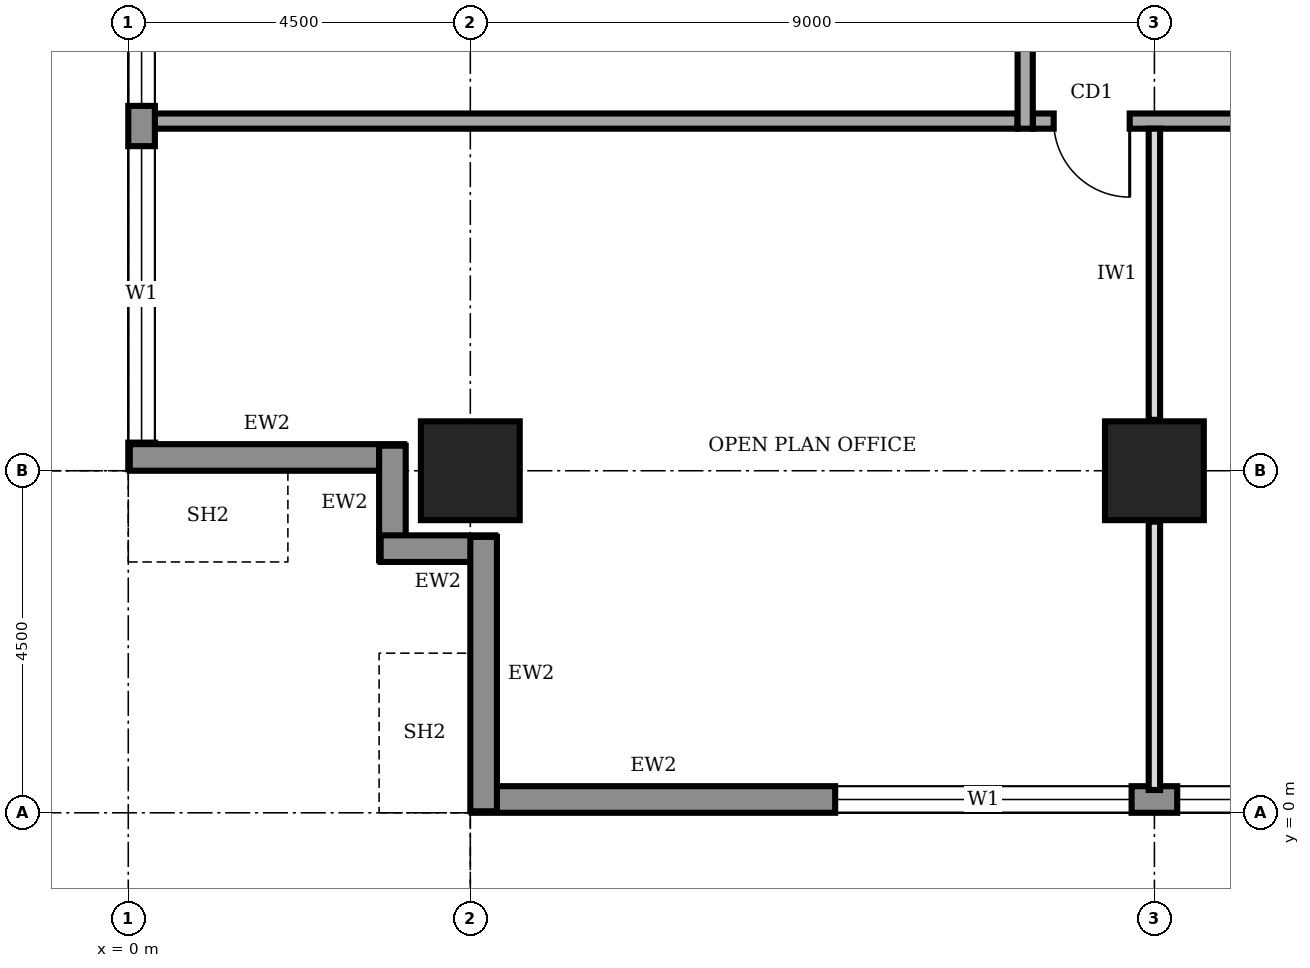
"""IFC4 building model, lengths in metres.
Left out: names, types, materials, properties, quantities, classifications, styles, units other than length and angle.
Written with IfcOpenShell. Run it as: python <this file> out.ifc"""

import sys

from ifc_helpers import new_model, si_unit, direction, frame, frame_2d, origin, origin_2d, place, context, subcontext, project, spatial, rectangle, extrude, element, fill, save


model = new_model("IFC4")
c1 = context("Model", 3, precision=1e-05, world=origin(), true_north=direction((0.0, 1.0)))
c2 = subcontext(c1, "Body", "Model", "MODEL_VIEW")
j1 = project(units=[si_unit("LENGTHUNIT", "METRE"), si_unit("PLANEANGLEUNIT", "RADIAN")], contexts=[c1])
p1 = place(None, origin())
s1 = spatial("IfcSite", under=j1, at=p1, CompositionType="ELEMENT")
p2 = place(p1, origin())
s2 = spatial("IfcBuilding", under=s1, at=p2, CompositionType="ELEMENT")
p3 = place(p2, frame((0.0, 0.0, 281.0)))
s3 = spatial("IfcBuildingStorey", under=s2, at=p3, CompositionType="ELEMENT", Elevation=281.0)
for number, where, z_axis, x_axis in (
    (1, (4.5, 4.5, 0.0), (0.0, 0.0, 1.0), (1.0, 0.0, 0.0)),
    (2, (13.5, 4.5, 0.0), (0.0, 0.0, 1.0), (1.0, 0.0, 0.0)),
):
    element("IfcColumn", number, at=place(p3, frame(where, z_axis=z_axis, x_axis=x_axis)), inside=s3, PredefinedType="COLUMN", context=c2, shape_type="SweptSolid", body=[
        extrude(rectangle(XDim=1.3, YDim=1.3, at=origin_2d()), origin(), (0.0, 0.0, 1.0), 4.0),
    ])
p4 = place(p3, frame((4.52, 0.175, 0.0), z_axis=(0.0, 0.0, 1.0), x_axis=(1.0, 0.0, 0.0)))
e3 = element("IfcWall", 3, at=p4, inside=s3, PredefinedType="STANDARD", context=c2, shape_type="SweptSolid", body=[
    extrude(rectangle(XDim=31.46, YDim=0.35, at=frame_2d((15.73, 0.0))), origin(), (0.0, 0.0, 1.0), 3.75),
])
p5 = place(p4, frame((4.78, 0.0, 0.9)))
e4 = element("IfcOpeningElement", 4, at=p5, cuts=e3, PredefinedType="OPENING", context=c2, shape_type="SweptSolid", body=[
    extrude(rectangle(XDim=3.9, YDim=2.2, at=frame_2d((1.95, 1.1))), frame((0.0, 0.185, 0.0), z_axis=(0.0, -1.0, 0.0), x_axis=(1.0, 0.0, 0.0)), (0.0, 0.0, 1.0), 0.37),
])
p6 = place(p4, frame((9.28, 0.0, 0.9)))
e5 = element("IfcOpeningElement", 5, at=p6, cuts=e3, PredefinedType="OPENING", context=c2, shape_type="SweptSolid", body=[
    extrude(rectangle(XDim=3.9, YDim=2.2, at=frame_2d((1.95, 1.1))), frame((0.0, 0.185, 0.0), z_axis=(0.0, -1.0, 0.0), x_axis=(1.0, 0.0, 0.0)), (0.0, 0.0, 1.0), 0.37),
])
p7 = place(p4, frame((13.78, 0.0, 0.9)))
e6 = element("IfcOpeningElement", 6, at=p7, cuts=e3, PredefinedType="OPENING", context=c2, shape_type="SweptSolid", body=[
    extrude(rectangle(XDim=3.9, YDim=2.2, at=frame_2d((1.95, 1.1))), frame((0.0, 0.185, 0.0), z_axis=(0.0, -1.0, 0.0), x_axis=(1.0, 0.0, 0.0)), (0.0, 0.0, 1.0), 0.37),
])
p8 = place(p4, frame((18.28, 0.0, 0.9)))
e7 = element("IfcOpeningElement", 7, at=p8, cuts=e3, PredefinedType="OPENING", context=c2, shape_type="SweptSolid", body=[
    extrude(rectangle(XDim=3.9, YDim=2.2, at=frame_2d((1.95, 1.1))), frame((0.0, 0.185, 0.0), z_axis=(0.0, -1.0, 0.0), x_axis=(1.0, 0.0, 0.0)), (0.0, 0.0, 1.0), 0.37),
])
p9 = place(p4, frame((22.78, 0.0, 0.9)))
e8 = element("IfcOpeningElement", 8, at=p9, cuts=e3, PredefinedType="OPENING", context=c2, shape_type="SweptSolid", body=[
    extrude(rectangle(XDim=3.9, YDim=2.2, at=frame_2d((1.95, 1.1))), frame((0.0, 0.185, 0.0), z_axis=(0.0, -1.0, 0.0), x_axis=(1.0, 0.0, 0.0)), (0.0, 0.0, 1.0), 0.37),
])
p10 = place(p4, frame((27.21, 0.0, 0.9)))
e9 = element("IfcOpeningElement", 9, at=p10, cuts=e3, PredefinedType="OPENING", context=c2, shape_type="SweptSolid", body=[
    extrude(rectangle(XDim=3.9, YDim=2.2, at=frame_2d((1.95, 1.1))), frame((0.0, 0.185, 0.0), z_axis=(0.0, -1.0, 0.0), x_axis=(1.0, 0.0, 0.0)), (0.0, 0.0, 1.0), 0.37),
])
p11 = place(p3, frame((0.175, 35.98, 0.0), z_axis=(0.0, 0.0, 1.0), x_axis=(0.0, -1.0, 0.0)))
e10 = element("IfcWall", 10, at=p11, inside=s3, PredefinedType="STANDARD", context=c2, shape_type="SweptSolid", body=[
    extrude(rectangle(XDim=31.46, YDim=0.35, at=frame_2d((15.73, 0.0))), origin(), (0.0, 0.0, 1.0), 3.75),
])
p12 = place(p11, frame((27.21, 0.0, 0.9)))
e11 = element("IfcOpeningElement", 11, at=p12, cuts=e10, PredefinedType="OPENING", context=c2, shape_type="SweptSolid", body=[
    extrude(rectangle(XDim=3.9, YDim=2.2, at=frame_2d((1.95, 1.1))), frame((0.0, 0.185, 0.0), z_axis=(0.0, -1.0, 0.0), x_axis=(1.0, 0.0, 0.0)), (0.0, 0.0, 1.0), 0.37),
])
p13 = place(p11, frame((22.78, 0.0, 0.9)))
e12 = element("IfcOpeningElement", 12, at=p13, cuts=e10, PredefinedType="OPENING", context=c2, shape_type="SweptSolid", body=[
    extrude(rectangle(XDim=3.9, YDim=2.2, at=frame_2d((1.95, 1.1))), frame((0.0, 0.185, 0.0), z_axis=(0.0, -1.0, 0.0), x_axis=(1.0, 0.0, 0.0)), (0.0, 0.0, 1.0), 0.37),
])
p14 = place(p11, frame((18.28, 0.0, 0.9)))
e13 = element("IfcOpeningElement", 13, at=p14, cuts=e10, PredefinedType="OPENING", context=c2, shape_type="SweptSolid", body=[
    extrude(rectangle(XDim=3.9, YDim=2.2, at=frame_2d((1.95, 1.1))), frame((0.0, 0.185, 0.0), z_axis=(0.0, -1.0, 0.0), x_axis=(1.0, 0.0, 0.0)), (0.0, 0.0, 1.0), 0.37),
])
p15 = place(p11, frame((13.78, 0.0, 0.9)))
e14 = element("IfcOpeningElement", 14, at=p15, cuts=e10, PredefinedType="OPENING", context=c2, shape_type="SweptSolid", body=[
    extrude(rectangle(XDim=3.9, YDim=2.2, at=frame_2d((1.95, 1.1))), frame((0.0, 0.185, 0.0), z_axis=(0.0, -1.0, 0.0), x_axis=(1.0, 0.0, 0.0)), (0.0, 0.0, 1.0), 0.37),
])
p16 = place(p11, frame((9.28, 0.0, 0.9)))
e15 = element("IfcOpeningElement", 15, at=p16, cuts=e10, PredefinedType="OPENING", context=c2, shape_type="SweptSolid", body=[
    extrude(rectangle(XDim=3.9, YDim=2.2, at=frame_2d((1.95, 1.1))), frame((0.0, 0.185, 0.0), z_axis=(0.0, -1.0, 0.0), x_axis=(1.0, 0.0, 0.0)), (0.0, 0.0, 1.0), 0.37),
])
p17 = place(p11, frame((4.78, 0.0, 0.9)))
e16 = element("IfcOpeningElement", 16, at=p17, cuts=e10, PredefinedType="OPENING", context=c2, shape_type="SweptSolid", body=[
    extrude(rectangle(XDim=3.9, YDim=2.2, at=frame_2d((1.95, 1.1))), frame((0.0, 0.185, 0.0), z_axis=(0.0, -1.0, 0.0), x_axis=(1.0, 0.0, 0.0)), (0.0, 0.0, 1.0), 0.37),
])
p18 = place(p3, frame((0.02, 4.675, 0.0), z_axis=(0.0, 0.0, 1.0), x_axis=(1.0, 0.0, 0.0)))
e17 = element("IfcWall", 17, at=p18, inside=s3, PredefinedType="STANDARD", context=c2, shape_type="SweptSolid", body=[
    extrude(rectangle(XDim=3.61, YDim=0.35, at=frame_2d((1.805, 0.0))), origin(), (0.0, 0.0, 1.0), 2.85),
])
for number, where, z_axis, x_axis in (
    (18, (3.475, 4.83, 0.0), (0.0, 0.0, 1.0), (0.0, -1.0, 0.0)),
    (19, (3.32, 3.475, 0.0), (0.0, 0.0, 1.0), (1.0, 0.0, 0.0)),
):
    element("IfcWall", number, at=place(p3, frame(where, z_axis=z_axis, x_axis=x_axis)), inside=s3, PredefinedType="STANDARD", context=c2, shape_type="SweptSolid", body=[
        extrude(rectangle(XDim=1.51, YDim=0.35, at=frame_2d((0.755, 0.0))), origin(), (0.0, 0.0, 1.0), 3.75),
    ])
p19 = place(p3, frame((4.675, 3.63, 0.0), z_axis=(0.0, 0.0, 1.0), x_axis=(0.0, -1.0, 0.0)))
e20 = element("IfcWall", 20, at=p19, inside=s3, PredefinedType="STANDARD", context=c2, shape_type="SweptSolid", body=[
    extrude(rectangle(XDim=3.61, YDim=0.35, at=frame_2d((1.805, 0.0))), origin(), (0.0, 0.0, 1.0), 2.85),
])
p20 = place(p3, frame((11.9, 9.1, 0.0), z_axis=(0.0, 0.0, 1.0), x_axis=(1.0, 0.0, 0.0)))
e21 = element("IfcWall", 21, at=p20, inside=s3, PredefinedType="SOLIDWALL", context=c2, shape_type="SweptSolid", body=[
    extrude(rectangle(XDim=16.9, YDim=0.2, at=frame_2d((8.45, 0.0))), origin(), (0.0, 0.0, 1.0), 3.75),
])
p21 = place(p20, frame((0.275, 0.0, 0.0)))
e22 = element("IfcOpeningElement", 22, at=p21, cuts=e21, PredefinedType="OPENING", context=c2, shape_type="SweptSolid", body=[
    extrude(rectangle(XDim=1.0, YDim=2.1, at=frame_2d((0.5, 1.05))), frame((0.0, 0.11, 0.0), z_axis=(0.0, -1.0, 0.0), x_axis=(1.0, 0.0, 0.0)), (0.0, 0.0, 1.0), 0.22),
])
p22 = place(p20, frame((8.35, 0.0, 0.0)))
e23 = element("IfcOpeningElement", 23, at=p22, cuts=e21, PredefinedType="OPENING", context=c2, shape_type="SweptSolid", body=[
    extrude(rectangle(XDim=1.8, YDim=2.1, at=frame_2d((0.9, 1.05))), frame((0.0, 0.11, 0.0), z_axis=(0.0, -1.0, 0.0), x_axis=(1.0, 0.0, 0.0)), (0.0, 0.0, 1.0), 0.22),
])
p23 = place(p3, frame((11.8, 32.8, 0.0), z_axis=(0.0, 0.0, 1.0), x_axis=(0.0, -1.0, 0.0)))
e24 = element("IfcWall", 24, at=p23, inside=s3, PredefinedType="SOLIDWALL", context=c2, shape_type="SweptSolid", body=[
    extrude(rectangle(XDim=23.8, YDim=0.2, at=frame_2d((11.9, 0.0))), origin(), (0.0, 0.0, 1.0), 3.75),
])
p24 = place(p23, frame((21.05, 0.0, 0.0)))
e25 = element("IfcOpeningElement", 25, at=p24, cuts=e24, PredefinedType="OPENING", context=c2, shape_type="SweptSolid", body=[
    extrude(rectangle(XDim=1.0, YDim=2.1, at=frame_2d((0.5, 1.05))), frame((0.0, 0.11, 0.0), z_axis=(0.0, -1.0, 0.0), x_axis=(1.0, 0.0, 0.0)), (0.0, 0.0, 1.0), 0.22),
])
p25 = place(p23, frame((17.65, 0.0, 0.0)))
e26 = element("IfcOpeningElement", 26, at=p25, cuts=e24, PredefinedType="OPENING", context=c2, shape_type="SweptSolid", body=[
    extrude(rectangle(XDim=0.9, YDim=2.1, at=frame_2d((0.45, 1.05))), frame((0.0, 0.11, 0.0), z_axis=(0.0, -1.0, 0.0), x_axis=(1.0, 0.0, 0.0)), (0.0, 0.0, 1.0), 0.22),
])
p26 = place(p23, frame((14.45, 0.0, 0.0)))
e27 = element("IfcOpeningElement", 27, at=p26, cuts=e24, PredefinedType="OPENING", context=c2, shape_type="SweptSolid", body=[
    extrude(rectangle(XDim=0.9, YDim=2.1, at=frame_2d((0.45, 1.05))), frame((0.0, 0.11, 0.0), z_axis=(0.0, -1.0, 0.0), x_axis=(1.0, 0.0, 0.0)), (0.0, 0.0, 1.0), 0.22),
])
p27 = place(p23, frame((8.9, 0.0, 0.0)))
e28 = element("IfcOpeningElement", 28, at=p27, cuts=e24, PredefinedType="OPENING", context=c2, shape_type="SweptSolid", body=[
    extrude(rectangle(XDim=0.9, YDim=2.1, at=frame_2d((0.45, 1.05))), frame((0.0, 0.11, 0.0), z_axis=(0.0, -1.0, 0.0), x_axis=(1.0, 0.0, 0.0)), (0.0, 0.0, 1.0), 0.22),
])
p28 = place(p23, frame((6.3, 0.0, 0.0)))
e29 = element("IfcOpeningElement", 29, at=p28, cuts=e24, PredefinedType="OPENING", context=c2, shape_type="SweptSolid", body=[
    extrude(rectangle(XDim=1.0, YDim=2.1, at=frame_2d((0.5, 1.05))), frame((0.0, 0.11, 0.0), z_axis=(0.0, -1.0, 0.0), x_axis=(1.0, 0.0, 0.0)), (0.0, 0.0, 1.0), 0.22),
])
p29 = place(p23, frame((11.4, 0.0, 0.0)))
e30 = element("IfcOpeningElement", 30, at=p29, cuts=e24, PredefinedType="OPENING", context=c2, shape_type="SweptSolid", body=[
    extrude(rectangle(XDim=1.0, YDim=2.1, at=frame_2d((0.5, 1.05))), frame((0.0, 0.11, 0.0), z_axis=(0.0, -1.0, 0.0), x_axis=(1.0, 0.0, 0.0)), (0.0, 0.0, 1.0), 0.22),
])
p30 = place(p23, frame((2.3, 0.0, 0.0)))
e31 = element("IfcOpeningElement", 31, at=p30, cuts=e24, PredefinedType="OPENING", context=c2, shape_type="SweptSolid", body=[
    extrude(rectangle(XDim=1.0, YDim=2.1, at=frame_2d((0.5, 1.05))), frame((0.0, 0.11, 0.0), z_axis=(0.0, -1.0, 0.0), x_axis=(1.0, 0.0, 0.0)), (0.0, 0.0, 1.0), 0.22),
])
p31 = place(p3, frame((0.3, 9.1, 0.0), z_axis=(0.0, 0.0, 1.0), x_axis=(1.0, 0.0, 0.0)))
e32 = element("IfcWall", 32, at=p31, inside=s3, PredefinedType="SOLIDWALL", context=c2, shape_type="SweptSolid", body=[
    extrude(rectangle(XDim=11.4, YDim=0.2, at=frame_2d((5.7, 0.0))), origin(), (0.0, 0.0, 1.0), 3.75),
])
p32 = place(p3, frame((13.5, 0.3, 0.0), z_axis=(0.0, 0.0, 1.0), x_axis=(0.0, 1.0, 0.0)))
e33 = element("IfcWall", 33, at=p32, inside=s3, PredefinedType="PARTITIONING", context=c2, shape_type="SweptSolid", body=[
    extrude(rectangle(XDim=3.53, YDim=0.15, at=frame_2d((1.765, 0.0))), origin(), (0.0, 0.0, 1.0), 2.85),
])
p33 = place(p3, frame((13.5, 5.17, 0.0), z_axis=(0.0, 0.0, 1.0), x_axis=(0.0, 1.0, 0.0)))
e34 = element("IfcWall", 34, at=p33, inside=s3, PredefinedType="PARTITIONING", context=c2, shape_type="SweptSolid", body=[
    extrude(rectangle(XDim=3.83, YDim=0.15, at=frame_2d((1.915, 0.0))), origin(), (0.0, 0.0, 1.0), 2.85),
])
p34 = place(p5, origin())
e35 = element("IfcWindow", 35, at=p34, inside=s3, PartitioningType="SINGLE_PANEL", PredefinedType="WINDOW", context=c2, shape_type="SweptSolid", body=[
    extrude(rectangle(XDim=3.9, YDim=2.2, at=frame_2d((1.95, 1.1))), frame((0.0, 0.03, 0.0), z_axis=(0.0, -1.0, 0.0), x_axis=(1.0, 0.0, 0.0)), (0.0, 0.0, 1.0), 0.06),
])
fill(e4, e35)
p35 = place(p6, origin())
e36 = element("IfcWindow", 36, at=p35, inside=s3, PartitioningType="SINGLE_PANEL", PredefinedType="WINDOW", context=c2, shape_type="SweptSolid", body=[
    extrude(rectangle(XDim=3.9, YDim=2.2, at=frame_2d((1.95, 1.1))), frame((0.0, 0.03, 0.0), z_axis=(0.0, -1.0, 0.0), x_axis=(1.0, 0.0, 0.0)), (0.0, 0.0, 1.0), 0.06),
])
fill(e5, e36)
p36 = place(p12, origin())
e37 = element("IfcWindow", 37, at=p36, inside=s3, PartitioningType="SINGLE_PANEL", PredefinedType="WINDOW", context=c2, shape_type="SweptSolid", body=[
    extrude(rectangle(XDim=3.9, YDim=2.2, at=frame_2d((1.95, 1.1))), frame((0.0, 0.03, 0.0), z_axis=(0.0, -1.0, 0.0), x_axis=(1.0, 0.0, 0.0)), (0.0, 0.0, 1.0), 0.06),
])
fill(e11, e37)
p37 = place(p13, origin())
e38 = element("IfcWindow", 38, at=p37, inside=s3, PartitioningType="SINGLE_PANEL", PredefinedType="WINDOW", context=c2, shape_type="SweptSolid", body=[
    extrude(rectangle(XDim=3.9, YDim=2.2, at=frame_2d((1.95, 1.1))), frame((0.0, 0.03, 0.0), z_axis=(0.0, -1.0, 0.0), x_axis=(1.0, 0.0, 0.0)), (0.0, 0.0, 1.0), 0.06),
])
fill(e12, e38)
p38 = place(p21, frame((1.0, 0.0, 0.0), z_axis=(0.0, 0.0, 1.0), x_axis=(-1.0, 0.0, 0.0)))
e39 = element("IfcDoor", 39, at=p38, inside=s3, OperationType="SINGLE_SWING_LEFT", PredefinedType="DOOR", context=c2, shape_type="SweptSolid", body=[
    extrude(rectangle(XDim=1.0, YDim=2.1, at=frame_2d((0.5, 1.05))), frame((0.0, 0.025, 0.0), z_axis=(0.0, -1.0, 0.0), x_axis=(1.0, 0.0, 0.0)), (0.0, 0.0, 1.0), 0.05),
])
fill(e22, e39)
save(model, sys.argv[1])
